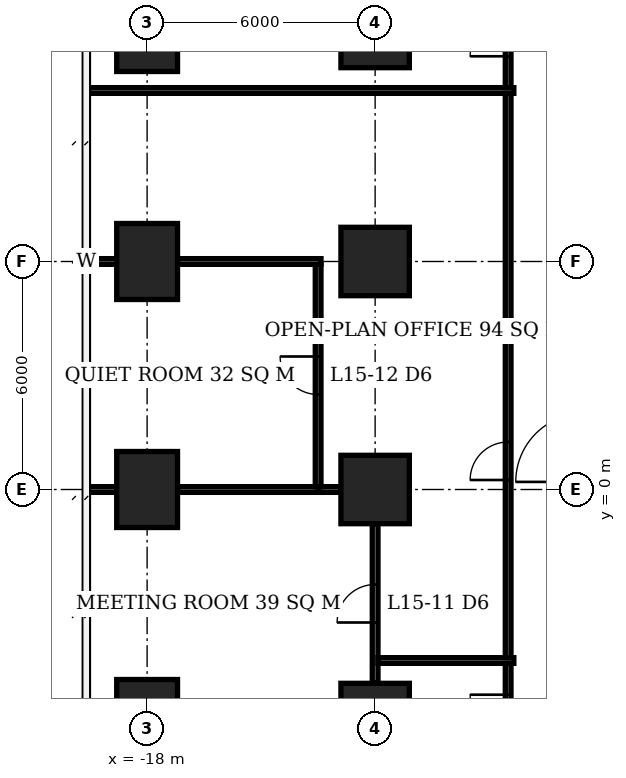
"""IFC4 building model, lengths in metres.
Left out: names, types, materials, properties, quantities, classifications, styles, units other than length and angle.
Written with IfcOpenShell. Run it as: python <this file> out.ifc"""

import sys

from ifc_helpers import new_model, si_unit, direction, frame, frame_2d, origin, origin_2d, place, context, subcontext, project, spatial, rectangle, extrude, element, fill, save


model = new_model("IFC4")
c1 = context("Model", 3, precision=1e-05, world=origin(), true_north=direction((0.0, 1.0)))
c2 = subcontext(c1, "Body", "Model", "MODEL_VIEW")
j1 = project(units=[si_unit("LENGTHUNIT", "METRE"), si_unit("PLANEANGLEUNIT", "RADIAN")], contexts=[c1])
p1 = place(None, origin())
s1 = spatial("IfcSite", under=j1, at=p1, CompositionType="ELEMENT")
p2 = place(p1, origin())
s2 = spatial("IfcBuilding", under=s1, at=p2, CompositionType="ELEMENT")
p3 = place(p2, frame((0.0, 0.0, 65.0)))
s3 = spatial("IfcBuildingStorey", under=s2, at=p3, CompositionType="ELEMENT", Elevation=65.0)
for number, where, z_axis, x_axis in (
    (1, (-18.0, -6.0, 0.0), (0.0, 0.0, 1.0), (0.0, 1.0, 0.0)),
    (2, (-18.0, 0.0, 0.0), (0.0, 0.0, 1.0), (0.0, 1.0, 0.0)),
    (3, (-18.0, 6.0, 0.0), (0.0, 0.0, 1.0), (0.0, 1.0, 0.0)),
    (4, (-18.0, 12.0, 0.0), (0.0, 0.0, 1.0), (0.0, 1.0, 0.0)),
):
    element("IfcColumn", number, at=place(p3, frame(where, z_axis=z_axis, x_axis=x_axis)), inside=s3, PredefinedType="COLUMN", context=c2, shape_type="SweptSolid", body=[
        extrude(rectangle(XDim=2.0, YDim=1.6, at=origin_2d()), origin(), (0.0, 0.0, 1.0), 3.9),
    ])
for number, where, z_axis, x_axis in (
    (5, (-12.0, -6.0, 0.0), (0.0, 0.0, 1.0), (1.0, 0.0, 0.0)),
    (6, (-12.0, 0.0, 0.0), (0.0, 0.0, 1.0), (1.0, 0.0, 0.0)),
    (7, (-12.0, 6.0, 0.0), (0.0, 0.0, 1.0), (1.0, 0.0, 0.0)),
    (8, (-12.0, 12.0, 0.0), (0.0, 0.0, 1.0), (1.0, 0.0, 0.0)),
):
    element("IfcColumn", number, at=place(p3, frame(where, z_axis=z_axis, x_axis=x_axis)), inside=s3, PredefinedType="COLUMN", context=c2, shape_type="SweptSolid", body=[
        extrude(rectangle(XDim=1.8, YDim=1.8, at=origin_2d()), origin(), (0.0, 0.0, 1.0), 3.9),
    ])
p4 = place(p3, frame((-19.6, 0.0, 0.0), z_axis=(0.0, 0.0, 1.0), x_axis=(1.0, 0.0, 0.0)))
e9 = element("IfcWall", 9, at=p4, inside=s3, PredefinedType="PARTITIONING", context=c2, shape_type="SweptSolid", body=[
    extrude(rectangle(XDim=0.8, YDim=0.15, at=frame_2d((0.4, 0.0))), origin(), (0.0, 0.0, 1.0), 3.65),
])
p5 = place(p3, frame((-17.2, 0.0, 0.0), z_axis=(0.0, 0.0, 1.0), x_axis=(1.0, 0.0, 0.0)))
e10 = element("IfcWall", 10, at=p5, inside=s3, PredefinedType="PARTITIONING", context=c2, shape_type="SweptSolid", body=[
    extrude(rectangle(XDim=3.775, YDim=0.15, at=frame_2d((1.887, 0.0))), origin(), (0.0, 0.0, 1.0), 3.65),
])
p6 = place(p3, frame((-13.5, 0.0, 0.0), z_axis=(0.0, 0.0, 1.0), x_axis=(1.0, 0.0, 0.0)))
e11 = element("IfcWall", 11, at=p6, inside=s3, PredefinedType="PARTITIONING", context=c2, shape_type="SweptSolid", body=[
    extrude(rectangle(XDim=0.6, YDim=0.15, at=frame_2d((0.3, 0.0))), origin(), (0.0, 0.0, 1.0), 3.65),
])
p7 = place(p3, frame((-19.55, 6.0, 0.0), z_axis=(0.0, 0.0, 1.0), x_axis=(1.0, 0.0, 0.0)))
e12 = element("IfcWall", 12, at=p7, inside=s3, PredefinedType="PARTITIONING", context=c2, shape_type="SweptSolid", body=[
    extrude(rectangle(XDim=0.75, YDim=0.15, at=frame_2d((0.375, 0.0))), origin(), (0.0, 0.0, 1.0), 3.65),
])
p8 = place(p3, frame((-17.2, 6.0, 0.0), z_axis=(0.0, 0.0, 1.0), x_axis=(1.0, 0.0, 0.0)))
e13 = element("IfcWall", 13, at=p8, inside=s3, PredefinedType="PARTITIONING", context=c2, shape_type="SweptSolid", body=[
    extrude(rectangle(XDim=3.775, YDim=0.15, at=frame_2d((1.887, 0.0))), origin(), (0.0, 0.0, 1.0), 3.65),
])
p9 = place(p3, frame((-13.5, 0.075, 0.0), z_axis=(0.0, 0.0, 1.0), x_axis=(0.0, 1.0, 0.0)))
e14 = element("IfcWall", 14, at=p9, inside=s3, PredefinedType="PARTITIONING", context=c2, shape_type="SweptSolid", body=[
    extrude(rectangle(XDim=5.85, YDim=0.15, at=frame_2d((2.925, 0.0))), origin(), (0.0, 0.0, 1.0), 3.65),
])
p10 = place(p9, frame((2.425, 0.0, 0.0)))
e15 = element("IfcOpeningElement", 15, at=p10, cuts=e14, PredefinedType="OPENING", context=c2, shape_type="SweptSolid", body=[
    extrude(rectangle(XDim=1.0, YDim=2.1, at=frame_2d((0.5, 1.05))), frame((0.0, 0.085, 0.0), z_axis=(0.0, -1.0, 0.0), x_axis=(1.0, 0.0, 0.0)), (0.0, 0.0, 1.0), 0.17),
])
p11 = place(p3, frame((-12.0, -5.1, 0.0), z_axis=(0.0, 0.0, 1.0), x_axis=(0.0, 1.0, 0.0)))
e16 = element("IfcWall", 16, at=p11, inside=s3, PredefinedType="PARTITIONING", context=c2, shape_type="SweptSolid", body=[
    extrude(rectangle(XDim=4.2, YDim=0.15, at=frame_2d((2.1, 0.0))), origin(), (0.0, 0.0, 1.0), 3.65),
])
p12 = place(p11, frame((1.6, 0.0, 0.0)))
e17 = element("IfcOpeningElement", 17, at=p12, cuts=e16, PredefinedType="OPENING", context=c2, shape_type="SweptSolid", body=[
    extrude(rectangle(XDim=1.0, YDim=2.1, at=frame_2d((0.5, 1.05))), frame((0.0, 0.085, 0.0), z_axis=(0.0, -1.0, 0.0), x_axis=(1.0, 0.0, 0.0)), (0.0, 0.0, 1.0), 0.17),
])
p13 = place(p3, frame((-19.6, 10.5, 0.0), z_axis=(0.0, 0.0, 1.0), x_axis=(1.0, 0.0, 0.0)))
e18 = element("IfcWall", 18, at=p13, inside=s3, PredefinedType="PARTITIONING", context=c2, shape_type="SweptSolid", body=[
    extrude(rectangle(XDim=11.25, YDim=0.15, at=frame_2d((5.625, 0.0))), origin(), (0.0, 0.0, 1.0), 3.65),
])
p14 = place(p3, frame((-11.925, -4.5, 0.0), z_axis=(0.0, 0.0, 1.0), x_axis=(1.0, 0.0, 0.0)))
e19 = element("IfcWall", 19, at=p14, inside=s3, PredefinedType="PARTITIONING", context=c2, shape_type="SweptSolid", body=[
    extrude(rectangle(XDim=3.575, YDim=0.15, at=frame_2d((1.788, 0.0))), origin(), (0.0, 0.0, 1.0), 3.65),
])
p15 = place(p3, frame((-8.5, -8.425, 0.0), z_axis=(0.0, 0.0, 1.0), x_axis=(0.0, 1.0, 0.0)))
e20 = element("IfcWall", 20, at=p15, inside=s3, PredefinedType="PARTITIONING", context=c2, shape_type="SweptSolid", body=[
    extrude(rectangle(XDim=3.85, YDim=0.15, at=frame_2d((1.925, 0.0))), origin(), (0.0, 0.0, 1.0), 3.65),
])
p16 = place(p15, frame((2.025, 0.0, 0.0)))
e21 = element("IfcOpeningElement", 21, at=p16, cuts=e20, PredefinedType="OPENING", context=c2, shape_type="SweptSolid", body=[
    extrude(rectangle(XDim=1.0, YDim=2.1, at=frame_2d((0.5, 1.05))), frame((0.0, 0.085, 0.0), z_axis=(0.0, -1.0, 0.0), x_axis=(1.0, 0.0, 0.0)), (0.0, 0.0, 1.0), 0.17),
])
p17 = place(p3, frame((-8.5, -4.425, 0.0), z_axis=(0.0, 0.0, 1.0), x_axis=(0.0, 1.0, 0.0)))
e22 = element("IfcWall", 22, at=p17, inside=s3, PredefinedType="PARTITIONING", context=c2, shape_type="SweptSolid", body=[
    extrude(rectangle(XDim=14.85, YDim=0.15, at=frame_2d((7.425, 0.0))), origin(), (0.0, 0.0, 1.0), 3.65),
])
p18 = place(p17, frame((4.675, 0.0, 0.0)))
e23 = element("IfcOpeningElement", 23, at=p18, cuts=e22, PredefinedType="OPENING", context=c2, shape_type="SweptSolid", body=[
    extrude(rectangle(XDim=1.0, YDim=2.1, at=frame_2d((0.5, 1.05))), frame((0.0, 0.085, 0.0), z_axis=(0.0, -1.0, 0.0), x_axis=(1.0, 0.0, 0.0)), (0.0, 0.0, 1.0), 0.17),
])
p19 = place(p3, frame((-8.5, 10.575, 0.0), z_axis=(0.0, 0.0, 1.0), x_axis=(0.0, 1.0, 0.0)))
e24 = element("IfcWall", 24, at=p19, inside=s3, PredefinedType="PARTITIONING", context=c2, shape_type="SweptSolid", body=[
    extrude(rectangle(XDim=3.85, YDim=0.15, at=frame_2d((1.925, 0.0))), origin(), (0.0, 0.0, 1.0), 3.65),
])
p20 = place(p19, frame((0.825, 0.0, 0.0)))
e25 = element("IfcOpeningElement", 25, at=p20, cuts=e24, PredefinedType="OPENING", context=c2, shape_type="SweptSolid", body=[
    extrude(rectangle(XDim=1.0, YDim=2.1, at=frame_2d((0.5, 1.05))), frame((0.0, 0.085, 0.0), z_axis=(0.0, -1.0, 0.0), x_axis=(1.0, 0.0, 0.0)), (0.0, 0.0, 1.0), 0.17),
])
p21 = place(p12, origin())
e26 = element("IfcDoor", 26, at=p21, inside=s3, OperationType="SINGLE_SWING_LEFT", PredefinedType="DOOR", context=c2, shape_type="SweptSolid", body=[
    extrude(rectangle(XDim=1.0, YDim=2.1, at=frame_2d((0.5, 1.05))), frame((0.0, 0.025, 0.0), z_axis=(0.0, -1.0, 0.0), x_axis=(1.0, 0.0, 0.0)), (0.0, 0.0, 1.0), 0.05),
])
fill(e17, e26)
p22 = place(p10, origin())
e27 = element("IfcDoor", 27, at=p22, inside=s3, OperationType="SINGLE_SWING_RIGHT", PredefinedType="DOOR", context=c2, shape_type="SweptSolid", body=[
    extrude(rectangle(XDim=1.0, YDim=2.1, at=frame_2d((0.5, 1.05))), frame((0.0, 0.025, 0.0), z_axis=(0.0, -1.0, 0.0), x_axis=(1.0, 0.0, 0.0)), (0.0, 0.0, 1.0), 0.05),
])
fill(e15, e27)
p23 = place(p16, origin())
e28 = element("IfcDoor", 28, at=p23, inside=s3, OperationType="SINGLE_SWING_RIGHT", PredefinedType="DOOR", context=c2, shape_type="SweptSolid", body=[
    extrude(rectangle(XDim=1.0, YDim=2.1, at=frame_2d((0.5, 1.05))), frame((0.0, 0.025, 0.0), z_axis=(0.0, -1.0, 0.0), x_axis=(1.0, 0.0, 0.0)), (0.0, 0.0, 1.0), 0.05),
])
fill(e21, e28)
p24 = place(p18, origin())
e29 = element("IfcDoor", 29, at=p24, inside=s3, OperationType="SINGLE_SWING_LEFT", PredefinedType="DOOR", context=c2, shape_type="SweptSolid", body=[
    extrude(rectangle(XDim=1.0, YDim=2.1, at=frame_2d((0.5, 1.05))), frame((0.0, 0.025, 0.0), z_axis=(0.0, -1.0, 0.0), x_axis=(1.0, 0.0, 0.0)), (0.0, 0.0, 1.0), 0.05),
])
fill(e23, e29)
p25 = place(p20, origin())
e30 = element("IfcDoor", 30, at=p25, inside=s3, OperationType="SINGLE_SWING_LEFT", PredefinedType="DOOR", context=c2, shape_type="SweptSolid", body=[
    extrude(rectangle(XDim=1.0, YDim=2.1, at=frame_2d((0.5, 1.05))), frame((0.0, 0.025, 0.0), z_axis=(0.0, -1.0, 0.0), x_axis=(1.0, 0.0, 0.0)), (0.0, 0.0, 1.0), 0.05),
])
fill(e25, e30)
save(model, sys.argv[1])
